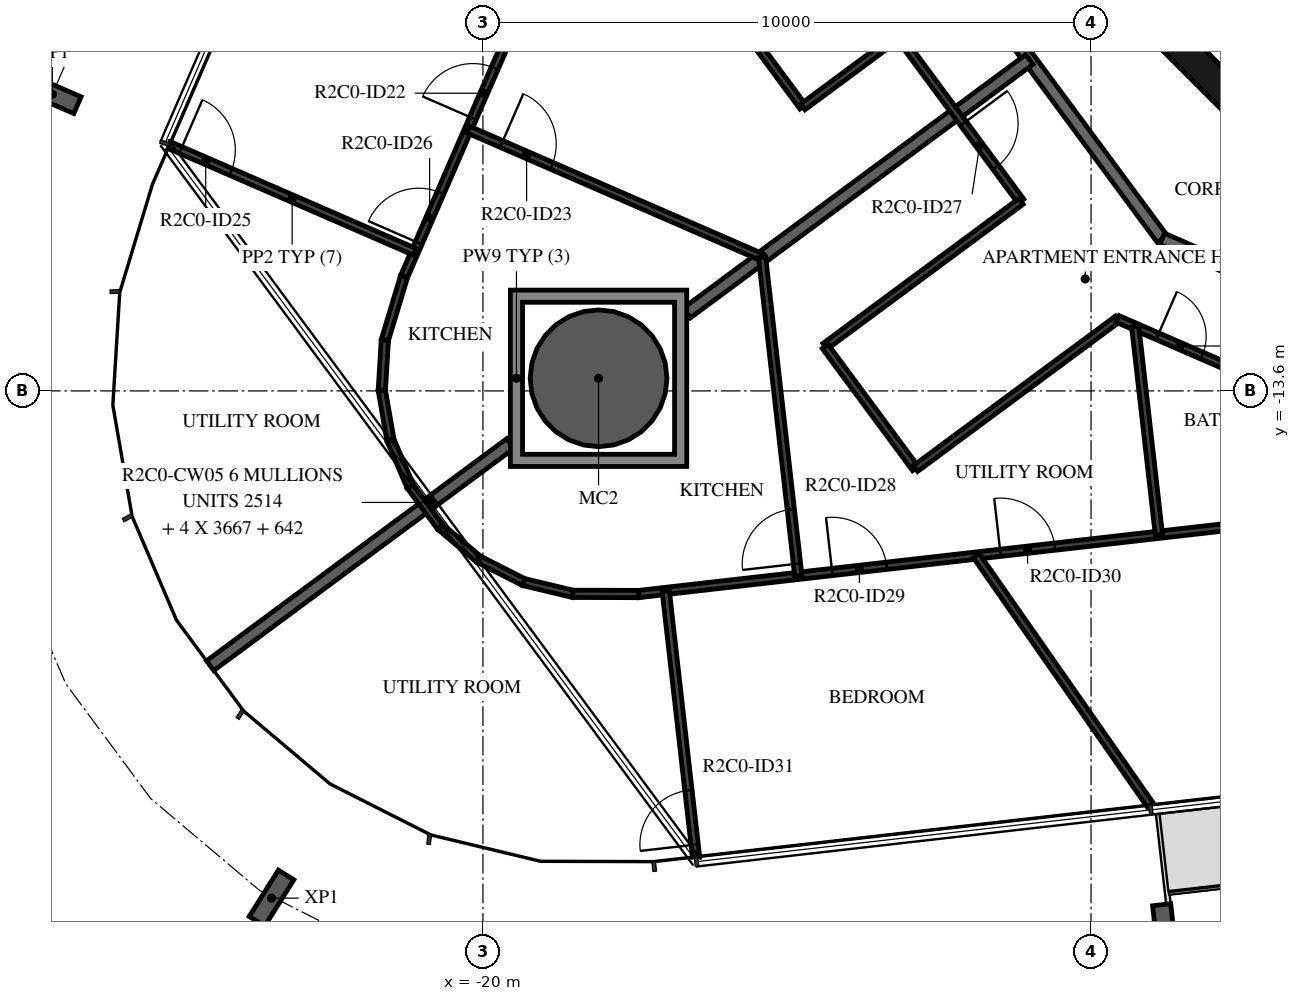
"""IFC4 building model, lengths in metres.
Left out: names, types, materials, properties, quantities, classifications, styles, units other than length and angle.
Written with IfcOpenShell. Run it as: python <this file> out.ifc"""

import sys

from ifc_helpers import new_model, si_unit, direction, frame, frame_2d, origin, origin_2d, place, context, subcontext, project, spatial, polyline, rectangle, hollow_circle, i_section, outline, extrude, element, fill, save


model = new_model("IFC4")
c1 = context("Model", 3, precision=1e-05, world=origin(), true_north=direction((0.0, 1.0)))
c2 = subcontext(c1, "Body", "Model", "MODEL_VIEW")
j1 = project(units=[si_unit("LENGTHUNIT", "METRE"), si_unit("PLANEANGLEUNIT", "RADIAN")], contexts=[c1])
p1 = place(None, origin())
s1 = spatial("IfcSite", under=j1, at=p1, CompositionType="ELEMENT")
p2 = place(p1, origin())
s2 = spatial("IfcBuilding", under=s1, at=p2, CompositionType="ELEMENT")
p3 = place(p2, frame((0.0, 0.0, 97.7)))
s3 = spatial("IfcBuildingStorey", under=s2, at=p3, CompositionType="ELEMENT", Elevation=97.7)
p4 = place(p3, frame((-18.099, -13.393, -0.38), z_axis=(0.0, 0.0, 1.0), x_axis=(1.0, 0.0, 0.0)))
e1 = element("IfcColumn", 1, at=p4, inside=s3, PredefinedType="COLUMN", context=c2, shape_type="SweptSolid", body=[
    extrude(hollow_circle(Radius=1.125, WallThickness=0.055, at=origin_2d()), origin(), (0.0, 0.0, 1.0), 3.5),
])
for number, where, z_axis, x_axis in (
    (2, (-27.081, -8.722, -0.38), (0.0, 0.0, 1.0), (0.399, 0.917, 0.0)),
    (3, (-23.477, -21.941, -0.38), (0.0, 0.0, 1.0), (-0.846, 0.532, 0.0)),
    (4, (-8.788, -22.497, -0.38), (0.0, 0.0, 1.0), (-0.994, -0.113, 0.0)),
):
    element("IfcColumn", number, at=place(p3, frame(where, z_axis=z_axis, x_axis=x_axis)), inside=s3, PredefinedType="COLUMN", context=c2, shape_type="SweptSolid", body=[
        extrude(i_section(OverallWidth=0.3, OverallDepth=0.9, WebThickness=0.019, FlangeThickness=0.035, FilletRadius=0.03, at=origin_2d()), origin(), (0.0, 0.0, 1.0), 3.5),
    ])
p5 = place(p3, frame((-9.308, -7.164, 0.0), z_axis=(0.0, 0.0, 1.0), x_axis=(0.707106781187, -0.707106781187, 0.0)))
e5 = element("IfcWall", 5, at=p5, inside=s3, PredefinedType="SHEAR", context=c2, shape_type="SweptSolid", body=[
    extrude(rectangle(XDim=3.032, YDim=0.5, at=frame_2d((1.516, 0.0))), origin(), (0.0, 0.0, 1.0), 3.12),
])
p6 = place(p3, frame((-13.196, -5.198, 0.0), z_axis=(0.0, 0.0, 1.0), x_axis=(0.594805187394, -0.803869883159, 0.0)))
e6 = element("IfcWall", 6, at=p6, inside=s3, PredefinedType="STANDARD", context=c2, shape_type="SweptSolid", body=[
    extrude(rectangle(XDim=7.342, YDim=0.2, at=frame_2d((3.671, 0.0))), origin(), (0.0, 0.0, 1.0), 3.12),
])
p7 = place(p3, frame((-8.829, -11.1, 0.0), z_axis=(0.0, 0.0, 1.0), x_axis=(0.917063622491, -0.398740908742, 0.0)))
e7 = element("IfcWall", 7, at=p7, inside=s3, PredefinedType="STANDARD", context=c2, shape_type="SweptSolid", body=[
    extrude(rectangle(XDim=7.24, YDim=0.2, at=frame_2d((3.62, 0.0))), origin(), (0.0, 0.0, 1.0), 3.12),
])
p8 = place(p7, frame((6.04, 0.0, 0.0)))
e8 = element("IfcOpeningElement", 8, at=p8, cuts=e7, PredefinedType="OPENING", context=c2, shape_type="SweptSolid", body=[
    extrude(rectangle(XDim=1.0, YDim=2.1, at=frame_2d((0.5, 1.05))), frame((0.0, 0.11, 0.0), z_axis=(0.0, -1.0, 0.0), x_axis=(1.0, 0.0, 0.0)), (0.0, 0.0, 1.0), 0.22),
])
p9 = place(p3, frame((-16.649, -12.32, 0.0), z_axis=(0.0, 0.0, 1.0), x_axis=(0.803869204071, 0.594806105169, 0.0)))
e9 = element("IfcWall", 9, at=p9, inside=s3, PredefinedType="STANDARD", context=c2, shape_type="SweptSolid", body=[
    extrude(rectangle(XDim=7.011, YDim=0.2, at=frame_2d((3.506, 0.0))), origin(), (0.0, 0.0, 1.0), 3.12),
])
p10 = place(p3, frame((-24.486, -18.119, 0.0), z_axis=(0.0, 0.0, 1.0), x_axis=(0.80384227933, 0.594842491726, 0.0)))
e10 = element("IfcWall", 10, at=p10, inside=s3, PredefinedType="STANDARD", context=c2, shape_type="SweptSolid", body=[
    extrude(rectangle(XDim=6.142, YDim=0.2, at=frame_2d((3.071, 0.0))), origin(), (0.0, 0.0, 1.0), 3.12),
])
p11 = place(p3, frame((-15.75, -7.562, 0.0), z_axis=(0.0, 0.0, 1.0), x_axis=(0.594863421241, -0.803826791087, 0.0)))
e11 = element("IfcWall", 11, at=p11, inside=s3, PredefinedType="PARTITIONING", context=c2, shape_type="SweptSolid", body=[
    extrude(rectangle(XDim=1.7, YDim=0.12, at=frame_2d((0.85, 0.0))), origin(), (0.0, 0.0, 1.0), 3.12),
])
p12 = place(p3, frame((-14.739, -8.929, 0.0), z_axis=(0.0, 0.0, 1.0), x_axis=(0.803901491033, 0.594762467474, 0.0)))
e12 = element("IfcWall", 12, at=p12, inside=s3, PredefinedType="PARTITIONING", context=c2, shape_type="SweptSolid", body=[
    extrude(rectangle(XDim=1.959, YDim=0.12, at=frame_2d((0.979, 0.0))), origin(), (0.0, 0.0, 1.0), 3.12),
])
p13 = place(p3, frame((-13.164, -7.764, 0.0), z_axis=(0.0, 0.0, 1.0), x_axis=(0.594837409261, -0.803846040324, 0.0)))
e13 = element("IfcWall", 13, at=p13, inside=s3, PredefinedType="PARTITIONING", context=c2, shape_type="SweptSolid", body=[
    extrude(rectangle(XDim=3.383, YDim=0.12, at=frame_2d((1.691, 0.0))), origin(), (0.0, 0.0, 1.0), 3.12),
])
p14 = place(p13, frame((1.789, 0.0, 0.0)))
e14 = element("IfcOpeningElement", 14, at=p14, cuts=e13, PredefinedType="OPENING", context=c2, shape_type="SweptSolid", body=[
    extrude(rectangle(XDim=0.9, YDim=2.1, at=frame_2d((0.45, 1.05))), frame((0.0, 0.07, 0.0), z_axis=(0.0, -1.0, 0.0), x_axis=(1.0, 0.0, 0.0)), (0.0, 0.0, 1.0), 0.14),
])
p15 = place(p3, frame((-21.298, -11.722, 0.0), z_axis=(0.0, 0.0, 1.0), x_axis=(0.398738972546, 0.91706446435, 0.0)))
e15 = element("IfcWall", 15, at=p15, inside=s3, PredefinedType="PARTITIONING", context=c2, shape_type="SweptSolid", body=[
    extrude(rectangle(XDim=14.577, YDim=0.12, at=frame_2d((7.288, 0.0))), origin(), (0.0, 0.0, 1.0), 3.12),
])
p16 = place(p15, frame((2.841, 0.0, 0.0)))
e16 = element("IfcOpeningElement", 16, at=p16, cuts=e15, PredefinedType="OPENING", context=c2, shape_type="SweptSolid", body=[
    extrude(rectangle(XDim=0.9, YDim=2.1, at=frame_2d((0.45, 1.05))), frame((0.0, 0.07, 0.0), z_axis=(0.0, -1.0, 0.0), x_axis=(1.0, 0.0, 0.0)), (0.0, 0.0, 1.0), 0.14),
])
p17 = place(p15, frame((0.605, 0.0, 0.0)))
e17 = element("IfcOpeningElement", 17, at=p17, cuts=e15, PredefinedType="OPENING", context=c2, shape_type="SweptSolid", body=[
    extrude(rectangle(XDim=0.9, YDim=2.1, at=frame_2d((0.45, 1.05))), frame((0.0, 0.07, 0.0), z_axis=(0.0, -1.0, 0.0), x_axis=(1.0, 0.0, 0.0)), (0.0, 0.0, 1.0), 0.14),
])
p18 = place(p3, frame((-25.156, -9.559, 0.0), z_axis=(0.0, 0.0, 1.0), x_axis=(0.917042707292, -0.398789008127, 0.0)))
e18 = element("IfcWall", 18, at=p18, inside=s3, PredefinedType="PARTITIONING", context=c2, shape_type="SweptSolid", body=[
    extrude(rectangle(XDim=4.4, YDim=0.12, at=frame_2d((2.2, 0.0))), origin(), (0.0, 0.0, 1.0), 2.73),
])
p19 = place(p18, frame((0.2, 0.0, 0.0)))
e19 = element("IfcOpeningElement", 19, at=p19, cuts=e18, PredefinedType="OPENING", context=c2, shape_type="SweptSolid", body=[
    extrude(rectangle(XDim=0.9, YDim=2.1, at=frame_2d((0.45, 1.05))), frame((0.0, 0.07, 0.0), z_axis=(0.0, -1.0, 0.0), x_axis=(1.0, 0.0, 0.0)), (0.0, 0.0, 1.0), 0.14),
])
p20 = place(p3, frame((-20.245, -9.3, 0.0), z_axis=(0.0, 0.0, 1.0), x_axis=(0.91706784774, -0.398731190956, 0.0)))
e20 = element("IfcWall", 20, at=p20, inside=s3, PredefinedType="PARTITIONING", context=c2, shape_type="SweptSolid", body=[
    extrude(rectangle(XDim=5.272, YDim=0.12, at=frame_2d((2.636, 0.0))), origin(), (0.0, 0.0, 1.0), 3.12),
])
p21 = place(p20, frame((0.6, 0.0, 0.0)))
e21 = element("IfcOpeningElement", 21, at=p21, cuts=e20, PredefinedType="OPENING", context=c2, shape_type="SweptSolid", body=[
    extrude(rectangle(XDim=0.9, YDim=2.1, at=frame_2d((0.45, 1.05))), frame((0.0, 0.07, 0.0), z_axis=(0.0, -1.0, 0.0), x_axis=(1.0, 0.0, 0.0)), (0.0, 0.0, 1.0), 0.14),
])
for number, where, z_axis, x_axis in (
    (22, (-20.703, -15.835, 0.0), (0.0, 0.0, 1.0), (-0.595, 0.804, 0.0)),
    (23, (-21.196, -15.168, 0.0), (0.0, 0.0, 1.0), (-0.394, 0.919, 0.0)),
):
    element("IfcWall", number, at=place(p3, frame(where, z_axis=z_axis, x_axis=x_axis)), inside=s3, PredefinedType="PARTITIONING", context=c2, shape_type="SweptSolid", body=[
        extrude(rectangle(XDim=0.829, YDim=0.12, at=frame_2d((0.415, 0.0))), origin(), (0.0, 0.0, 1.0), 3.12),
    ])
p22 = place(p3, frame((-21.522, -14.406, 0.0), z_axis=(0.0, 0.0, 1.0), x_axis=(-0.170794347099, 0.985306698952, 0.0)))
e24 = element("IfcWall", 24, at=p22, inside=s3, PredefinedType="PARTITIONING", context=c2, shape_type="SweptSolid", body=[
    extrude(rectangle(XDim=0.829, YDim=0.12, at=frame_2d((0.415, 0.0))), origin(), (0.0, 0.0, 1.0), 3.12),
])
p23 = place(p3, frame((-21.664, -13.59, 0.0), z_axis=(0.0, 0.0, 1.0), x_axis=(0.061277779288, 0.998120751095, 0.0)))
e25 = element("IfcWall", 25, at=p23, inside=s3, PredefinedType="PARTITIONING", context=c2, shape_type="SweptSolid", body=[
    extrude(rectangle(XDim=0.829, YDim=0.12, at=frame_2d((0.414, 0.0))), origin(), (0.0, 0.0, 1.0), 3.12),
])
p24 = place(p3, frame((-21.613, -12.762, 0.0), z_axis=(0.0, 0.0, 1.0), x_axis=(0.289552239308, 0.95716221233, 0.0)))
e26 = element("IfcWall", 26, at=p24, inside=s3, PredefinedType="PARTITIONING", context=c2, shape_type="SweptSolid", body=[
    extrude(rectangle(XDim=1.087, YDim=0.12, at=frame_2d((0.543, 0.0))), origin(), (0.0, 0.0, 1.0), 3.12),
])
p25 = place(p3, frame((-11.152, -10.483, 0.0), z_axis=(0.0, 0.0, 1.0), x_axis=(-0.803843064298, -0.594841430954, 0.0)))
e27 = element("IfcWall", 27, at=p25, inside=s3, PredefinedType="PARTITIONING", context=c2, shape_type="SweptSolid", body=[
    extrude(rectangle(XDim=4.008, YDim=0.12, at=frame_2d((2.004, 0.0))), origin(), (0.0, 0.0, 1.0), 3.12),
])
p26 = place(p3, frame((-14.374, -12.867, 0.0), z_axis=(0.0, 0.0, 1.0), x_axis=(0.594800097121, -0.803873649565, 0.0)))
e28 = element("IfcWall", 28, at=p26, inside=s3, PredefinedType="PARTITIONING", context=c2, shape_type="SweptSolid", body=[
    extrude(rectangle(XDim=2.5, YDim=0.12, at=frame_2d((1.25, 0.0))), origin(), (0.0, 0.0, 1.0), 3.12),
])
p27 = place(p3, frame((-12.886, -14.877, 0.0), z_axis=(0.0, 0.0, 1.0), x_axis=(0.803816491389, 0.594877338761, 0.0)))
e29 = element("IfcWall", 29, at=p27, inside=s3, PredefinedType="PARTITIONING", context=c2, shape_type="SweptSolid", body=[
    extrude(rectangle(XDim=4.135, YDim=0.12, at=frame_2d((2.068, 0.0))), origin(), (0.0, 0.0, 1.0), 3.12),
])
p28 = place(p3, frame((-9.562, -12.417, 0.0), z_axis=(0.0, 0.0, 1.0), x_axis=(0.917063169851, -0.398741949767, 0.0)))
e30 = element("IfcWall", 30, at=p28, inside=s3, PredefinedType="PARTITIONING", context=c2, shape_type="SweptSolid", body=[
    extrude(rectangle(XDim=7.891, YDim=0.12, at=frame_2d((3.946, 0.0))), origin(), (0.0, 0.0, 1.0), 3.12),
])
p29 = place(p28, frame((0.715, 0.0, 0.0)))
e31 = element("IfcOpeningElement", 31, at=p29, cuts=e30, PredefinedType="OPENING", context=c2, shape_type="SweptSolid", body=[
    extrude(rectangle(XDim=0.8, YDim=2.1, at=frame_2d((0.4, 1.05))), frame((0.0, 0.07, 0.0), z_axis=(0.0, -1.0, 0.0), x_axis=(1.0, 0.0, 0.0)), (0.0, 0.0, 1.0), 0.14),
])
for number, where, z_axis, x_axis in (
    (32, (-20.703, -15.835, 0.0), (0.0, 0.0, 1.0), (0.764, -0.645, 0.0)),
    (33, (-20.069, -16.369, 0.0), (0.0, 0.0, 1.0), (0.892, -0.451, 0.0)),
):
    element("IfcWall", number, at=place(p3, frame(where, z_axis=z_axis, x_axis=x_axis)), inside=s3, PredefinedType="PARTITIONING", context=c2, shape_type="SweptSolid", body=[
        extrude(rectangle(XDim=0.829, YDim=0.12, at=frame_2d((0.415, 0.0))), origin(), (0.0, 0.0, 1.0), 3.12),
    ])
p30 = place(p3, frame((-19.33, -16.744, 0.0), z_axis=(0.0, 0.0, 1.0), x_axis=(0.972403343288, -0.23330610357, 0.0)))
e34 = element("IfcWall", 34, at=p30, inside=s3, PredefinedType="PARTITIONING", context=c2, shape_type="SweptSolid", body=[
    extrude(rectangle(XDim=0.829, YDim=0.12, at=frame_2d((0.415, 0.0))), origin(), (0.0, 0.0, 1.0), 3.12),
])
p31 = place(p3, frame((-18.524, -16.937, 0.0), z_axis=(0.0, 0.0, 1.0), x_axis=(0.999995736722, -0.00292002349, 0.0)))
e35 = element("IfcWall", 35, at=p31, inside=s3, PredefinedType="PARTITIONING", context=c2, shape_type="SweptSolid", body=[
    extrude(rectangle(XDim=1.087, YDim=0.12, at=frame_2d((0.543, 0.0))), origin(), (0.0, 0.0, 1.0), 3.12),
])
p32 = place(p3, frame((-17.437, -16.94, 0.0), z_axis=(0.0, 0.0, 1.0), x_axis=(0.993573314119, 0.113190412448, 0.0)))
e36 = element("IfcWall", 36, at=p32, inside=s3, PredefinedType="PARTITIONING", context=c2, shape_type="SweptSolid", body=[
    extrude(rectangle(XDim=14.576, YDim=0.12, at=frame_2d((7.288, 0.0))), origin(), (0.0, 0.0, 1.0), 3.12),
])
p33 = place(p32, frame((3.201, 0.0, 0.0)))
e37 = element("IfcOpeningElement", 37, at=p33, cuts=e36, PredefinedType="OPENING", context=c2, shape_type="SweptSolid", body=[
    extrude(rectangle(XDim=0.9, YDim=2.1, at=frame_2d((0.45, 1.05))), frame((0.0, 0.07, 0.0), z_axis=(0.0, -1.0, 0.0), x_axis=(1.0, 0.0, 0.0)), (0.0, 0.0, 1.0), 0.14),
])
p34 = place(p32, frame((5.985, 0.0, 0.0)))
e38 = element("IfcOpeningElement", 38, at=p34, cuts=e36, PredefinedType="OPENING", context=c2, shape_type="SweptSolid", body=[
    extrude(rectangle(XDim=0.9, YDim=2.1, at=frame_2d((0.45, 1.05))), frame((0.0, 0.07, 0.0), z_axis=(0.0, -1.0, 0.0), x_axis=(1.0, 0.0, 0.0)), (0.0, 0.0, 1.0), 0.14),
])
p35 = place(p3, frame((-14.813, -16.641, 0.0), z_axis=(0.0, 0.0, 1.0), x_axis=(-0.113210971478, 0.993570971767, 0.0)))
e39 = element("IfcWall", 39, at=p35, inside=s3, PredefinedType="PARTITIONING", context=c2, shape_type="SweptSolid", body=[
    extrude(rectangle(XDim=5.273, YDim=0.12, at=frame_2d((2.636, 0.0))), origin(), (0.0, 0.0, 1.0), 3.12),
])
p36 = place(p35, frame((0.2, 0.0, 0.0)))
e40 = element("IfcOpeningElement", 40, at=p36, cuts=e39, PredefinedType="OPENING", context=c2, shape_type="SweptSolid", body=[
    extrude(rectangle(XDim=0.9, YDim=2.1, at=frame_2d((0.45, 1.05))), frame((0.0, 0.07, 0.0), z_axis=(0.0, -1.0, 0.0), x_axis=(1.0, 0.0, 0.0)), (0.0, 0.0, 1.0), 0.14),
])
p37 = place(p3, frame((-16.496, -21.262, 0.0), z_axis=(0.0, 0.0, 1.0), x_axis=(-0.1132445713, 0.993567142709, 0.0)))
e41 = element("IfcWall", 41, at=p37, inside=s3, PredefinedType="PARTITIONING", context=c2, shape_type="SweptSolid", body=[
    extrude(rectangle(XDim=4.4, YDim=0.12, at=frame_2d((2.2, 0.0))), origin(), (0.0, 0.0, 1.0), 2.73),
])
p38 = place(p37, frame((0.2, 0.0, 0.0)))
e42 = element("IfcOpeningElement", 42, at=p38, cuts=e41, PredefinedType="OPENING", context=c2, shape_type="SweptSolid", body=[
    extrude(rectangle(XDim=0.9, YDim=2.1, at=frame_2d((0.45, 1.05))), frame((0.0, 0.07, 0.0), z_axis=(0.0, -1.0, 0.0), x_axis=(1.0, 0.0, 0.0)), (0.0, 0.0, 1.0), 0.14),
])
p39 = place(p3, frame((-8.884, -15.966, 0.0), z_axis=(0.0, 0.0, 1.0), x_axis=(-0.113230836929, 0.993568708026, 0.0)))
e43 = element("IfcWall", 43, at=p39, inside=s3, PredefinedType="PARTITIONING", context=c2, shape_type="SweptSolid", body=[
    extrude(rectangle(XDim=3.446, YDim=0.12, at=frame_2d((1.723, 0.0))), origin(), (0.0, 0.0, 1.0), 3.12),
])
p40 = place(p3, frame((-9.026, -20.41, 0.0), z_axis=(0.0, 0.0, 1.0), x_axis=(-0.57218083256, 0.82012748695, 0.0)))
e44 = element("IfcWall", 44, at=p40, inside=s3, PredefinedType="PARTITIONING", context=c2, shape_type="SweptSolid", body=[
    extrude(rectangle(XDim=5.002, YDim=0.12, at=frame_2d((2.501, 0.0))), origin(), (0.0, 0.0, 1.0), 3.12),
])
p41 = place(p3, origin())
e45 = element("IfcWall", 45, at=p41, inside=s3, PredefinedType="STANDARD", context=c2, shape_type="SweptSolid", body=[
    extrude(outline(polyline([(-16.649, -11.942), (-16.649, -14.843), (-19.549, -14.843), (-19.549, -11.942), (-16.649, -11.942)]), holes=[polyline([(-19.349, -14.643), (-16.849, -14.643), (-16.849, -12.143), (-19.349, -12.143), (-19.349, -14.643)])]), origin(), (0.0, 0.0, 1.0), 3.12),
])
p42 = place(p16, origin())
e46 = element("IfcDoor", 46, at=p42, inside=s3, OperationType="SINGLE_SWING_RIGHT", PredefinedType="DOOR", context=c2, shape_type="SweptSolid", body=[
    extrude(rectangle(XDim=0.9, YDim=2.1, at=frame_2d((0.45, 1.05))), frame((0.0, 0.025, 0.0), z_axis=(0.0, -1.0, 0.0), x_axis=(1.0, 0.0, 0.0)), (0.0, 0.0, 1.0), 0.05),
])
fill(e16, e46)
p43 = place(p21, origin())
e47 = element("IfcDoor", 47, at=p43, inside=s3, OperationType="SINGLE_SWING_RIGHT", PredefinedType="DOOR", context=c2, shape_type="SweptSolid", body=[
    extrude(rectangle(XDim=0.9, YDim=2.1, at=frame_2d((0.45, 1.05))), frame((0.0, 0.025, 0.0), z_axis=(0.0, -1.0, 0.0), x_axis=(1.0, 0.0, 0.0)), (0.0, 0.0, 1.0), 0.05),
])
fill(e21, e47)
p44 = place(p19, origin())
e48 = element("IfcDoor", 48, at=p44, inside=s3, OperationType="SINGLE_SWING_RIGHT", PredefinedType="DOOR", context=c2, shape_type="SweptSolid", body=[
    extrude(rectangle(XDim=0.9, YDim=2.1, at=frame_2d((0.45, 1.05))), frame((0.0, 0.025, 0.0), z_axis=(0.0, -1.0, 0.0), x_axis=(1.0, 0.0, 0.0)), (0.0, 0.0, 1.0), 0.05),
])
fill(e19, e48)
p45 = place(p17, origin())
e49 = element("IfcDoor", 49, at=p45, inside=s3, OperationType="SINGLE_SWING_LEFT", PredefinedType="DOOR", context=c2, shape_type="SweptSolid", body=[
    extrude(rectangle(XDim=0.9, YDim=2.1, at=frame_2d((0.45, 1.05))), frame((0.0, 0.025, 0.0), z_axis=(0.0, -1.0, 0.0), x_axis=(1.0, 0.0, 0.0)), (0.0, 0.0, 1.0), 0.05),
])
fill(e17, e49)
p46 = place(p14, origin())
e50 = element("IfcDoor", 50, at=p46, inside=s3, OperationType="SINGLE_SWING_LEFT", PredefinedType="DOOR", context=c2, shape_type="SweptSolid", body=[
    extrude(rectangle(XDim=0.9, YDim=2.1, at=frame_2d((0.45, 1.05))), frame((0.0, 0.025, 0.0), z_axis=(0.0, -1.0, 0.0), x_axis=(1.0, 0.0, 0.0)), (0.0, 0.0, 1.0), 0.05),
])
fill(e14, e50)
p47 = place(p29, origin())
e51 = element("IfcDoor", 51, at=p47, inside=s3, OperationType="SINGLE_SWING_LEFT", PredefinedType="DOOR", context=c2, shape_type="SweptSolid", body=[
    extrude(rectangle(XDim=0.8, YDim=2.1, at=frame_2d((0.4, 1.05))), frame((0.0, 0.025, 0.0), z_axis=(0.0, -1.0, 0.0), x_axis=(1.0, 0.0, 0.0)), (0.0, 0.0, 1.0), 0.05),
])
fill(e31, e51)
p48 = place(p36, origin())
e52 = element("IfcDoor", 52, at=p48, inside=s3, OperationType="SINGLE_SWING_LEFT", PredefinedType="DOOR", context=c2, shape_type="SweptSolid", body=[
    extrude(rectangle(XDim=0.9, YDim=2.1, at=frame_2d((0.45, 1.05))), frame((0.0, 0.025, 0.0), z_axis=(0.0, -1.0, 0.0), x_axis=(1.0, 0.0, 0.0)), (0.0, 0.0, 1.0), 0.05),
])
fill(e40, e52)
p49 = place(p33, origin())
e53 = element("IfcDoor", 53, at=p49, inside=s3, OperationType="SINGLE_SWING_LEFT", PredefinedType="DOOR", context=c2, shape_type="SweptSolid", body=[
    extrude(rectangle(XDim=0.9, YDim=2.1, at=frame_2d((0.45, 1.05))), frame((0.0, 0.025, 0.0), z_axis=(0.0, -1.0, 0.0), x_axis=(1.0, 0.0, 0.0)), (0.0, 0.0, 1.0), 0.05),
])
fill(e37, e53)
p50 = place(p34, origin())
e54 = element("IfcDoor", 54, at=p50, inside=s3, OperationType="SINGLE_SWING_LEFT", PredefinedType="DOOR", context=c2, shape_type="SweptSolid", body=[
    extrude(rectangle(XDim=0.9, YDim=2.1, at=frame_2d((0.45, 1.05))), frame((0.0, 0.025, 0.0), z_axis=(0.0, -1.0, 0.0), x_axis=(1.0, 0.0, 0.0)), (0.0, 0.0, 1.0), 0.05),
])
fill(e38, e54)
p51 = place(p38, origin())
e55 = element("IfcDoor", 55, at=p51, inside=s3, OperationType="SINGLE_SWING_LEFT", PredefinedType="DOOR", context=c2, shape_type="SweptSolid", body=[
    extrude(rectangle(XDim=0.9, YDim=2.1, at=frame_2d((0.45, 1.05))), frame((0.0, 0.025, 0.0), z_axis=(0.0, -1.0, 0.0), x_axis=(1.0, 0.0, 0.0)), (0.0, 0.0, 1.0), 0.05),
])
fill(e42, e55)
save(model, sys.argv[1])
